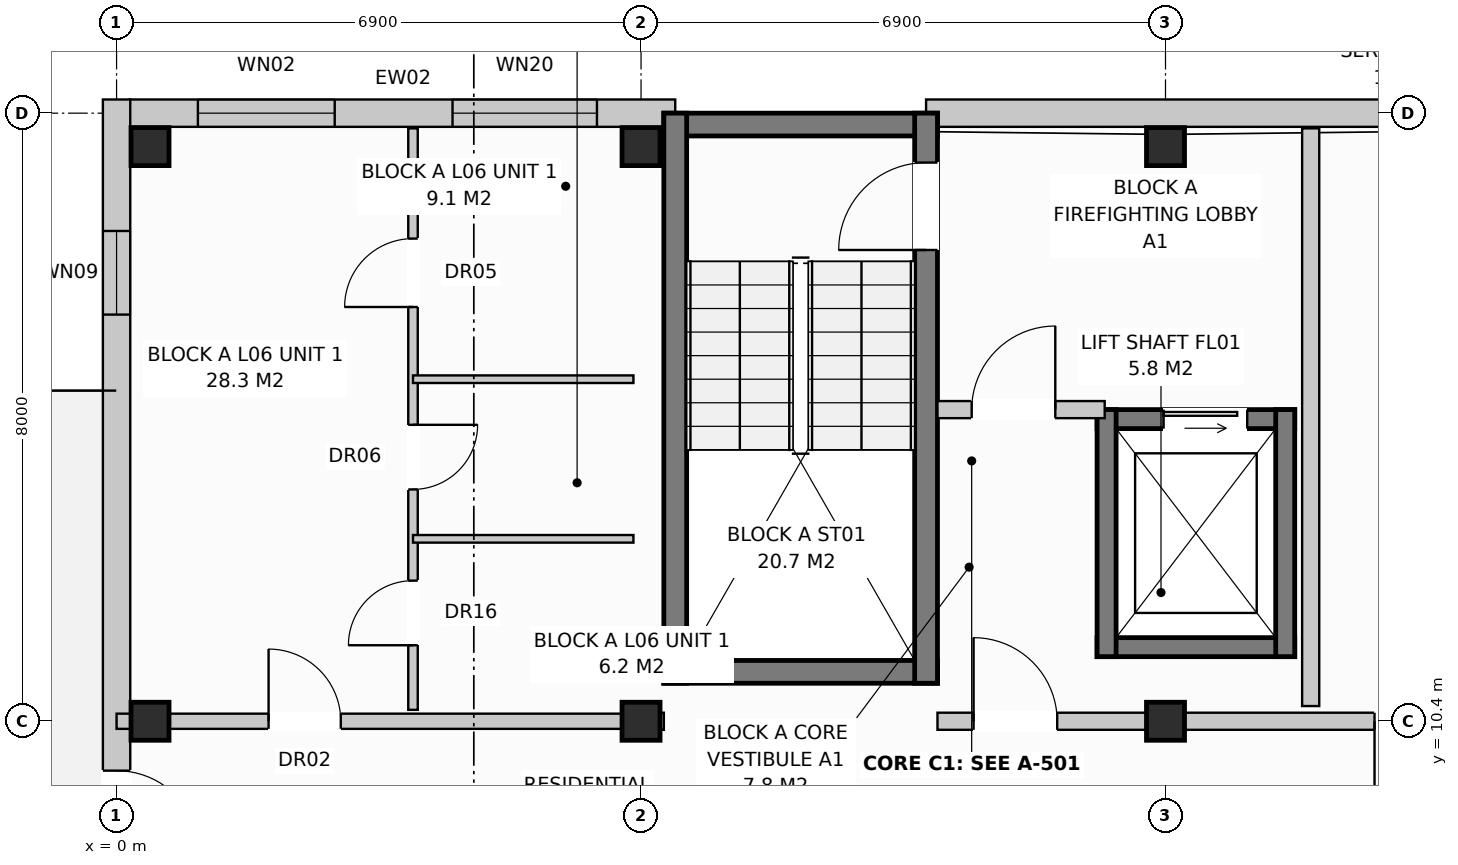
"""IFC4 building model, lengths in metres.
Left out: names, types, materials, properties, quantities, classifications, styles, units other than length and angle.
Written with IfcOpenShell. Run it as: python <this file> out.ifc"""

import sys

from ifc_helpers import new_model, si_unit, direction, frame, frame_2d, origin, origin_with_axes, origin_2d, place, context, subcontext, project, spatial, rectangle, extrude, element, fill, save


model = new_model("IFC4")
c1 = context("Model", 3, precision=1e-05, world=origin(), true_north=direction((0.0, 1.0)))
c2 = subcontext(c1, "Body", "Model", "MODEL_VIEW")
j1 = project(units=[si_unit("LENGTHUNIT", "METRE"), si_unit("PLANEANGLEUNIT", "RADIAN")], contexts=[c1])
p1 = place(None, origin())
s1 = spatial("IfcSite", under=j1, at=p1, CompositionType="ELEMENT")
p2 = place(p1, origin())
s2 = spatial("IfcBuilding", under=s1, at=p2, CompositionType="ELEMENT")
p3 = place(p2, frame((0.0, 0.0, 20.8)))
s3 = spatial("IfcBuildingStorey", under=s2, at=p3, CompositionType="ELEMENT", Elevation=20.8)
for number, where, z_axis, x_axis in (
    (1, (0.44, 10.4, 0.0), (0.0, 0.0, 1.0), (1.0, 0.0, 0.0)),
    (2, (0.44, 17.96, 0.0), (0.0, 0.0, 1.0), (1.0, 0.0, 0.0)),
    (3, (6.9, 10.4, 0.0), (0.0, 0.0, 1.0), (1.0, 0.0, 0.0)),
    (4, (6.9, 17.96, 0.0), (0.0, 0.0, 1.0), (1.0, 0.0, 0.0)),
    (5, (13.8, 10.4, 0.0), (0.0, 0.0, 1.0), (1.0, 0.0, 0.0)),
    (6, (13.8, 17.96, 0.0), (0.0, 0.0, 1.0), (1.0, 0.0, 0.0)),
):
    element("IfcColumn", number, at=place(p3, frame(where, z_axis=z_axis, x_axis=x_axis)), inside=s3, PredefinedType="COLUMN", context=c2, shape_type="SweptSolid", body=[
        extrude(rectangle(XDim=0.5, YDim=0.5, at=origin_2d()), origin(), (0.0, 0.0, 1.0), 3.2),
    ])
p4 = place(p3, frame((0.17, 18.4, 0.0), z_axis=(0.0, 0.0, 1.0), x_axis=(1.0, 0.0, 0.0)))
e7 = element("IfcWall", 7, at=p4, inside=s3, PredefinedType="STANDARD", context=c2, shape_type="SweptSolid", body=[
    extrude(rectangle(XDim=7.18, YDim=0.36, at=frame_2d((3.59, 0.0))), origin(), (0.0, 0.0, 1.0), 2.95),
])
p5 = place(p4, frame((0.9, 0.0, 0.8)))
e8 = element("IfcOpeningElement", 8, at=p5, cuts=e7, PredefinedType="OPENING", context=c2, shape_type="SweptSolid", body=[
    extrude(rectangle(XDim=1.8, YDim=1.7, at=frame_2d((0.9, 0.85))), frame((0.0, 0.192, 0.0), z_axis=(0.0, -1.0, 0.0), x_axis=(1.0, 0.0, 0.0)), (0.0, 0.0, 1.0), 0.384),
])
p6 = place(p4, frame((4.25, 0.0, 0.8)))
e9 = element("IfcOpeningElement", 9, at=p6, cuts=e7, PredefinedType="OPENING", context=c2, shape_type="SweptSolid", body=[
    extrude(rectangle(XDim=1.9, YDim=1.85, at=frame_2d((0.95, 0.925))), frame((0.0, 0.192, 0.0), z_axis=(0.0, -1.0, 0.0), x_axis=(1.0, 0.0, 0.0)), (0.0, 0.0, 1.0), 0.384),
])
p7 = place(p3, frame((10.65, 18.4, 0.0), z_axis=(0.0, 0.0, 1.0), x_axis=(1.0, 0.0, 0.0)))
e10 = element("IfcWall", 10, at=p7, inside=s3, PredefinedType="STANDARD", context=c2, shape_type="SweptSolid", body=[
    extrude(rectangle(XDim=17.4, YDim=0.36, at=frame_2d((8.7, 0.0))), origin(), (0.0, 0.0, 1.0), 2.95),
])
p8 = place(p7, frame((11.82, 0.0, 0.0)))
e11 = element("IfcOpeningElement", 11, at=p8, cuts=e10, PredefinedType="OPENING", context=c2, shape_type="SweptSolid", body=[
    extrude(rectangle(XDim=1.05, YDim=2.12, at=frame_2d((0.525, 1.06))), frame((0.0, 0.192, 0.0), z_axis=(0.0, -1.0, 0.0), x_axis=(1.0, 0.0, 0.0)), (0.0, 0.0, 1.0), 0.384),
])
p9 = place(p7, frame((14.87, 0.0, 0.72)))
e12 = element("IfcOpeningElement", 12, at=p9, cuts=e10, PredefinedType="OPENING", context=c2, shape_type="SweptSolid", body=[
    extrude(rectangle(XDim=1.1, YDim=1.5, at=frame_2d((0.55, 0.75))), frame((0.0, 0.192, 0.0), z_axis=(0.0, -1.0, 0.0), x_axis=(1.0, 0.0, 0.0)), (0.0, 0.0, 1.0), 0.384),
])
p10 = place(p3, frame((0.0, -0.18, 0.0), z_axis=(0.0, 0.0, 1.0), x_axis=(0.0, 1.0, 0.0)))
e13 = element("IfcWall", 13, at=p10, inside=s3, PredefinedType="STANDARD", context=c2, shape_type="SweptSolid", body=[
    extrude(rectangle(XDim=18.76, YDim=0.36, at=frame_2d((9.38, 0.0))), origin(), (0.0, 0.0, 1.0), 2.95),
])
p11 = place(p10, frame((8.83, 0.0, 0.0)))
e14 = element("IfcOpeningElement", 14, at=p11, cuts=e13, PredefinedType="OPENING", context=c2, shape_type="SweptSolid", body=[
    extrude(rectangle(XDim=1.1, YDim=2.1, at=frame_2d((0.55, 1.05))), frame((0.0, 0.192, 0.0), z_axis=(0.0, -1.0, 0.0), x_axis=(1.0, 0.0, 0.0)), (0.0, 0.0, 1.0), 0.384),
])
p12 = place(p10, frame((1.73, 0.0, 0.72)))
e15 = element("IfcOpeningElement", 15, at=p12, cuts=e13, PredefinedType="OPENING", context=c2, shape_type="SweptSolid", body=[
    extrude(rectangle(XDim=1.1, YDim=1.5, at=frame_2d((0.55, 0.75))), frame((0.0, 0.192, 0.0), z_axis=(0.0, -1.0, 0.0), x_axis=(1.0, 0.0, 0.0)), (0.0, 0.0, 1.0), 0.384),
])
p13 = place(p10, frame((15.93, 0.0, 0.72)))
e16 = element("IfcOpeningElement", 16, at=p13, cuts=e13, PredefinedType="OPENING", context=c2, shape_type="SweptSolid", body=[
    extrude(rectangle(XDim=1.1, YDim=1.5, at=frame_2d((0.55, 0.75))), frame((0.0, 0.192, 0.0), z_axis=(0.0, -1.0, 0.0), x_axis=(1.0, 0.0, 0.0)), (0.0, 0.0, 1.0), 0.384),
])
for number, where, z_axis, x_axis in (
    (17, (7.2, 18.25, 0.0), (0.0, 0.0, 1.0), (1.0, 0.0, 0.0)),
    (18, (7.2, 11.05, 0.0), (0.0, 0.0, 1.0), (1.0, 0.0, 0.0)),
):
    element("IfcWall", number, at=place(p3, frame(where, z_axis=z_axis, x_axis=x_axis)), inside=s3, PredefinedType="SHEAR", context=c2, shape_type="SweptSolid", body=[
        extrude(rectangle(XDim=3.6, YDim=0.3, at=frame_2d((1.8, 0.0))), origin(), (0.0, 0.0, 1.0), 2.95),
    ])
p14 = place(p3, frame((7.35, 10.9, 0.0), z_axis=(0.0, 0.0, 1.0), x_axis=(0.0, 1.0, 0.0)))
e19 = element("IfcWall", 19, at=p14, inside=s3, PredefinedType="SHEAR", context=c2, shape_type="SweptSolid", body=[
    extrude(rectangle(XDim=7.5, YDim=0.3, at=frame_2d((3.75, 0.0))), origin(), (0.0, 0.0, 1.0), 2.95),
])
p15 = place(p3, frame((10.65, 10.9, 0.0), z_axis=(0.0, 0.0, 1.0), x_axis=(0.0, 1.0, 0.0)))
e20 = element("IfcWall", 20, at=p15, inside=s3, PredefinedType="SHEAR", context=c2, shape_type="SweptSolid", body=[
    extrude(rectangle(XDim=7.5, YDim=0.3, at=frame_2d((3.75, 0.0))), origin(), (0.0, 0.0, 1.0), 2.95),
])
p16 = place(p15, frame((5.7, 0.0, 0.0)))
e21 = element("IfcOpeningElement", 21, at=p16, cuts=e20, PredefinedType="OPENING", context=c2, shape_type="SweptSolid", body=[
    extrude(rectangle(XDim=1.15, YDim=2.15, at=frame_2d((0.575, 1.075))), frame((0.0, 0.162, 0.0), z_axis=(0.0, -1.0, 0.0), x_axis=(1.0, 0.0, 0.0)), (0.0, 0.0, 1.0), 0.324),
])
p17 = place(p3, frame((12.9, 14.375, 0.0), z_axis=(0.0, 0.0, 1.0), x_axis=(1.0, 0.0, 0.0)))
e22 = element("IfcWall", 22, at=p17, inside=s3, PredefinedType="SHEAR", context=c2, shape_type="SweptSolid", body=[
    extrude(rectangle(XDim=2.6, YDim=0.25, at=frame_2d((1.3, 0.0))), origin(), (0.0, 0.0, 1.0), 2.95),
])
p18 = place(p17, frame((0.875, 0.0, 0.0)))
e23 = element("IfcOpeningElement", 23, at=p18, cuts=e22, PredefinedType="OPENING", context=c2, shape_type="SweptSolid", body=[
    extrude(rectangle(XDim=1.1, YDim=2.1, at=frame_2d((0.55, 1.05))), frame((0.0, 0.137, 0.0), z_axis=(0.0, -1.0, 0.0), x_axis=(1.0, 0.0, 0.0)), (0.0, 0.0, 1.0), 0.274),
])
p19 = place(p3, frame((12.9, 11.375, 0.0), z_axis=(0.0, 0.0, 1.0), x_axis=(1.0, 0.0, 0.0)))
e24 = element("IfcWall", 24, at=p19, inside=s3, PredefinedType="SHEAR", context=c2, shape_type="SweptSolid", body=[
    extrude(rectangle(XDim=2.6, YDim=0.25, at=frame_2d((1.3, 0.0))), origin(), (0.0, 0.0, 1.0), 2.95),
])
for number, where, z_axis, x_axis in (
    (25, (13.025, 11.25, 0.0), (0.0, 0.0, 1.0), (0.0, 1.0, 0.0)),
    (26, (15.375, 11.25, 0.0), (0.0, 0.0, 1.0), (0.0, 1.0, 0.0)),
):
    element("IfcWall", number, at=place(p3, frame(where, z_axis=z_axis, x_axis=x_axis)), inside=s3, PredefinedType="SHEAR", context=c2, shape_type="SweptSolid", body=[
        extrude(rectangle(XDim=3.25, YDim=0.25, at=frame_2d((1.625, 0.0))), origin(), (0.0, 0.0, 1.0), 2.95),
    ])
p20 = place(p3, frame((15.71, 10.6, 0.0), z_axis=(0.0, 0.0, 1.0), x_axis=(0.0, 1.0, 0.0)))
e27 = element("IfcWall", 27, at=p20, inside=s3, PredefinedType="PARTITIONING", context=c2, shape_type="SweptSolid", body=[
    extrude(rectangle(XDim=7.6, YDim=0.225, at=frame_2d((3.8, 0.0))), origin(), (0.0, 0.0, 1.0), 2.59),
])
p21 = place(p3, frame((10.8, 14.5, 0.0), z_axis=(0.0, 0.0, 1.0), x_axis=(1.0, 0.0, 0.0)))
e28 = element("IfcWall", 28, at=p21, inside=s3, PredefinedType="PARTITIONING", context=c2, shape_type="SweptSolid", body=[
    extrude(rectangle(XDim=2.2, YDim=0.225, at=frame_2d((1.1, 0.0))), origin(), (0.0, 0.0, 1.0), 2.95),
])
p22 = place(p21, frame((0.45, 0.0, 0.0)))
e29 = element("IfcOpeningElement", 29, at=p22, cuts=e28, PredefinedType="OPENING", context=c2, shape_type="SweptSolid", body=[
    extrude(rectangle(XDim=1.1, YDim=2.15, at=frame_2d((0.55, 1.075))), frame((0.0, 0.125, 0.0), z_axis=(0.0, -1.0, 0.0), x_axis=(1.0, 0.0, 0.0)), (0.0, 0.0, 1.0), 0.249),
])
p23 = place(p3, frame((6.9, 10.4, 0.0), z_axis=(0.0, 0.0, 1.0), x_axis=(1.0, 0.0, 0.0)))
e30 = element("IfcWall", 30, at=p23, inside=s3, PredefinedType="PARTITIONING", context=c2, shape_type="SweptSolid", body=[
    extrude(rectangle(XDim=0.3, YDim=0.225, at=frame_2d((0.15, 0.0))), origin(), (0.0, 0.0, 1.0), 2.95),
])
p24 = place(p3, frame((10.8, 10.4, 0.0), z_axis=(0.0, 0.0, 1.0), x_axis=(1.0, 0.0, 0.0)))
e31 = element("IfcWall", 31, at=p24, inside=s3, PredefinedType="PARTITIONING", context=c2, shape_type="SweptSolid", body=[
    extrude(rectangle(XDim=9.9, YDim=0.225, at=frame_2d((4.95, 0.0))), origin(), (0.0, 0.0, 1.0), 2.39),
])
p25 = place(p24, frame((0.475, 0.0, 0.0)))
e32 = element("IfcOpeningElement", 32, at=p25, cuts=e31, PredefinedType="OPENING", context=c2, shape_type="SweptSolid", body=[
    extrude(rectangle(XDim=1.1, YDim=2.15, at=frame_2d((0.55, 1.075))), frame((0.0, 0.125, 0.0), z_axis=(0.0, -1.0, 0.0), x_axis=(1.0, 0.0, 0.0)), (0.0, 0.0, 1.0), 0.249),
])
p26 = place(p24, frame((5.75, 0.0, 0.0)))
e33 = element("IfcOpeningElement", 33, at=p26, cuts=e31, PredefinedType="OPENING", context=c2, shape_type="SweptSolid", body=[
    extrude(rectangle(XDim=0.9, YDim=2.1, at=frame_2d((0.45, 1.05))), frame((0.0, 0.125, 0.0), z_axis=(0.0, -1.0, 0.0), x_axis=(1.0, 0.0, 0.0)), (0.0, 0.0, 1.0), 0.249),
])
p27 = place(p24, frame((7.8, 0.0, 0.0)))
e34 = element("IfcOpeningElement", 34, at=p27, cuts=e31, PredefinedType="OPENING", context=c2, shape_type="SweptSolid", body=[
    extrude(rectangle(XDim=0.95, YDim=2.15, at=frame_2d((0.475, 1.075))), frame((0.0, 0.125, 0.0), z_axis=(0.0, -1.0, 0.0), x_axis=(1.0, 0.0, 0.0)), (0.0, 0.0, 1.0), 0.249),
])
p28 = place(p3, frame((0.0, 10.4, 0.0), z_axis=(0.0, 0.0, 1.0), x_axis=(1.0, 0.0, 0.0)))
e35 = element("IfcWall", 35, at=p28, inside=s3, PredefinedType="PARTITIONING", context=c2, shape_type="SweptSolid", body=[
    extrude(rectangle(XDim=6.9, YDim=0.2, at=frame_2d((3.45, 0.0))), origin(), (0.0, 0.0, 1.0), 2.39),
])
p29 = place(p28, frame((2.0, 0.0, 0.0)))
e36 = element("IfcOpeningElement", 36, at=p29, cuts=e35, PredefinedType="OPENING", context=c2, shape_type="SweptSolid", body=[
    extrude(rectangle(XDim=0.95, YDim=2.15, at=frame_2d((0.475, 1.075))), frame((0.0, 0.112, 0.0), z_axis=(0.0, -1.0, 0.0), x_axis=(1.0, 0.0, 0.0)), (0.0, 0.0, 1.0), 0.224),
])
p30 = place(p3, frame((3.9, 10.55, 0.0), z_axis=(0.0, 0.0, 1.0), x_axis=(0.0, 1.0, 0.0)))
e37 = element("IfcWall", 37, at=p30, inside=s3, PredefinedType="PARTITIONING", context=c2, shape_type="SweptSolid", body=[
    extrude(rectangle(XDim=7.65, YDim=0.125, at=frame_2d((3.825, 0.0))), origin(), (0.0, 0.0, 1.0), 2.95),
])
p31 = place(p30, frame((0.85, 0.0, 0.0)))
e38 = element("IfcOpeningElement", 38, at=p31, cuts=e37, PredefinedType="OPENING", context=c2, shape_type="SweptSolid", body=[
    extrude(rectangle(XDim=0.85, YDim=2.1, at=frame_2d((0.425, 1.05))), frame((0.0, 0.074, 0.0), z_axis=(0.0, -1.0, 0.0), x_axis=(1.0, 0.0, 0.0)), (0.0, 0.0, 1.0), 0.149),
])
p32 = place(p30, frame((2.9, 0.0, 0.0)))
e39 = element("IfcOpeningElement", 39, at=p32, cuts=e37, PredefinedType="OPENING", context=c2, shape_type="SweptSolid", body=[
    extrude(rectangle(XDim=0.85, YDim=2.05, at=frame_2d((0.425, 1.025))), frame((0.0, 0.074, 0.0), z_axis=(0.0, -1.0, 0.0), x_axis=(1.0, 0.0, 0.0)), (0.0, 0.0, 1.0), 0.149),
])
p33 = place(p30, frame((5.3, 0.0, 0.0)))
e40 = element("IfcOpeningElement", 40, at=p33, cuts=e37, PredefinedType="OPENING", context=c2, shape_type="SweptSolid", body=[
    extrude(rectangle(XDim=0.9, YDim=2.1, at=frame_2d((0.45, 1.05))), frame((0.0, 0.074, 0.0), z_axis=(0.0, -1.0, 0.0), x_axis=(1.0, 0.0, 0.0)), (0.0, 0.0, 1.0), 0.149),
])
for number, where, z_axis, x_axis in (
    (41, (3.9, 12.8, 0.0), (0.0, 0.0, 1.0), (1.0, 0.0, 0.0)),
    (42, (3.9, 14.9, 0.0), (0.0, 0.0, 1.0), (1.0, 0.0, 0.0)),
):
    element("IfcWall", number, at=place(p3, frame(where, z_axis=z_axis, x_axis=x_axis)), inside=s3, PredefinedType="PARTITIONING", context=c2, shape_type="SweptSolid", body=[
        extrude(rectangle(XDim=2.9, YDim=0.1, at=frame_2d((1.45, 0.0))), origin(), (0.0, 0.0, 1.0), 2.95),
    ])
p34 = place(p5, origin_with_axes())
e43 = element("IfcWindow", 43, at=p34, inside=s3, PartitioningType="SINGLE_PANEL", PredefinedType="WINDOW", context=c2, shape_type="SweptSolid", body=[
    extrude(rectangle(XDim=1.8, YDim=1.7, at=frame_2d((0.9, 0.85))), frame((0.0, 0.03, 0.0), z_axis=(0.0, -1.0, 0.0), x_axis=(1.0, 0.0, 0.0)), (0.0, 0.0, 1.0), 0.06),
])
fill(e8, e43)
p35 = place(p6, origin_with_axes())
e44 = element("IfcWindow", 44, at=p35, inside=s3, PartitioningType="SINGLE_PANEL", PredefinedType="WINDOW", context=c2, shape_type="SweptSolid", body=[
    extrude(rectangle(XDim=1.9, YDim=1.85, at=frame_2d((0.95, 0.925))), frame((0.0, 0.03, 0.0), z_axis=(0.0, -1.0, 0.0), x_axis=(1.0, 0.0, 0.0)), (0.0, 0.0, 1.0), 0.06),
])
fill(e9, e44)
p36 = place(p11, frame((1.1, 0.0, 0.0), z_axis=(0.0, 0.0, 1.0), x_axis=(-1.0, 0.0, 0.0)))
e45 = element("IfcDoor", 45, at=p36, inside=s3, OperationType="SINGLE_SWING_LEFT", PredefinedType="DOOR", context=c2, shape_type="SweptSolid", body=[
    extrude(rectangle(XDim=1.1, YDim=2.1, at=frame_2d((0.55, 1.05))), frame((0.0, 0.025, 0.0), z_axis=(0.0, -1.0, 0.0), x_axis=(1.0, 0.0, 0.0)), (0.0, 0.0, 1.0), 0.05),
])
fill(e14, e45)
p37 = place(p13, origin_with_axes())
e46 = element("IfcWindow", 46, at=p37, inside=s3, PartitioningType="SINGLE_PANEL", PredefinedType="WINDOW", context=c2, shape_type="SweptSolid", body=[
    extrude(rectangle(XDim=1.1, YDim=1.5, at=frame_2d((0.55, 0.75))), frame((0.0, 0.03, 0.0), z_axis=(0.0, -1.0, 0.0), x_axis=(1.0, 0.0, 0.0)), (0.0, 0.0, 1.0), 0.06),
])
fill(e16, e46)
p38 = place(p16, origin_with_axes())
e47 = element("IfcDoor", 47, at=p38, inside=s3, OperationType="SINGLE_SWING_LEFT", PredefinedType="DOOR", context=c2, shape_type="SweptSolid", body=[
    extrude(rectangle(XDim=1.15, YDim=2.15, at=frame_2d((0.575, 1.075))), frame((0.0, 0.025, 0.0), z_axis=(0.0, -1.0, 0.0), x_axis=(1.0, 0.0, 0.0)), (0.0, 0.0, 1.0), 0.05),
])
fill(e21, e47)
p39 = place(p18, origin_with_axes())
e48 = element("IfcDoor", 48, at=p39, inside=s3, OperationType="SLIDING_TO_LEFT", PredefinedType="DOOR", context=c2, shape_type="SweptSolid", body=[
    extrude(rectangle(XDim=1.1, YDim=2.1, at=frame_2d((0.55, 1.05))), frame((0.0, 0.025, 0.0), z_axis=(0.0, -1.0, 0.0), x_axis=(1.0, 0.0, 0.0)), (0.0, 0.0, 1.0), 0.05),
])
fill(e23, e48)
p40 = place(p22, origin_with_axes())
e49 = element("IfcDoor", 49, at=p40, inside=s3, OperationType="SINGLE_SWING_RIGHT", PredefinedType="DOOR", context=c2, shape_type="SweptSolid", body=[
    extrude(rectangle(XDim=1.1, YDim=2.15, at=frame_2d((0.55, 1.075))), frame((0.0, 0.025, 0.0), z_axis=(0.0, -1.0, 0.0), x_axis=(1.0, 0.0, 0.0)), (0.0, 0.0, 1.0), 0.05),
])
fill(e29, e49)
p41 = place(p25, origin_with_axes())
e50 = element("IfcDoor", 50, at=p41, inside=s3, OperationType="SINGLE_SWING_LEFT", PredefinedType="DOOR", context=c2, shape_type="SweptSolid", body=[
    extrude(rectangle(XDim=1.1, YDim=2.15, at=frame_2d((0.55, 1.075))), frame((0.0, 0.025, 0.0), z_axis=(0.0, -1.0, 0.0), x_axis=(1.0, 0.0, 0.0)), (0.0, 0.0, 1.0), 0.05),
])
fill(e32, e50)
p42 = place(p26, frame((0.9, 0.0, 0.0), z_axis=(0.0, 0.0, 1.0), x_axis=(-1.0, 0.0, 0.0)))
e51 = element("IfcDoor", 51, at=p42, inside=s3, OperationType="SINGLE_SWING_LEFT", PredefinedType="DOOR", context=c2, shape_type="SweptSolid", body=[
    extrude(rectangle(XDim=0.9, YDim=2.1, at=frame_2d((0.45, 1.05))), frame((0.0, 0.025, 0.0), z_axis=(0.0, -1.0, 0.0), x_axis=(1.0, 0.0, 0.0)), (0.0, 0.0, 1.0), 0.05),
])
fill(e33, e51)
p43 = place(p29, origin_with_axes())
e52 = element("IfcDoor", 52, at=p43, inside=s3, OperationType="SINGLE_SWING_LEFT", PredefinedType="DOOR", context=c2, shape_type="SweptSolid", body=[
    extrude(rectangle(XDim=0.95, YDim=2.15, at=frame_2d((0.475, 1.075))), frame((0.0, 0.025, 0.0), z_axis=(0.0, -1.0, 0.0), x_axis=(1.0, 0.0, 0.0)), (0.0, 0.0, 1.0), 0.05),
])
fill(e36, e52)
p44 = place(p31, origin_with_axes())
e53 = element("IfcDoor", 53, at=p44, inside=s3, OperationType="SINGLE_SWING_LEFT", PredefinedType="DOOR", context=c2, shape_type="SweptSolid", body=[
    extrude(rectangle(XDim=0.85, YDim=2.1, at=frame_2d((0.425, 1.05))), frame((0.0, 0.025, 0.0), z_axis=(0.0, -1.0, 0.0), x_axis=(1.0, 0.0, 0.0)), (0.0, 0.0, 1.0), 0.05),
])
fill(e38, e53)
p45 = place(p32, frame((0.85, 0.0, 0.0), z_axis=(0.0, 0.0, 1.0), x_axis=(-1.0, 0.0, 0.0)))
e54 = element("IfcDoor", 54, at=p45, inside=s3, OperationType="SINGLE_SWING_RIGHT", PredefinedType="DOOR", context=c2, shape_type="SweptSolid", body=[
    extrude(rectangle(XDim=0.85, YDim=2.05, at=frame_2d((0.425, 1.025))), frame((0.0, 0.025, 0.0), z_axis=(0.0, -1.0, 0.0), x_axis=(1.0, 0.0, 0.0)), (0.0, 0.0, 1.0), 0.05),
])
fill(e39, e54)
p46 = place(p33, origin_with_axes())
e55 = element("IfcDoor", 55, at=p46, inside=s3, OperationType="SINGLE_SWING_LEFT", PredefinedType="DOOR", context=c2, shape_type="SweptSolid", body=[
    extrude(rectangle(XDim=0.9, YDim=2.1, at=frame_2d((0.45, 1.05))), frame((0.0, 0.025, 0.0), z_axis=(0.0, -1.0, 0.0), x_axis=(1.0, 0.0, 0.0)), (0.0, 0.0, 1.0), 0.05),
])
fill(e40, e55)
save(model, sys.argv[1])
